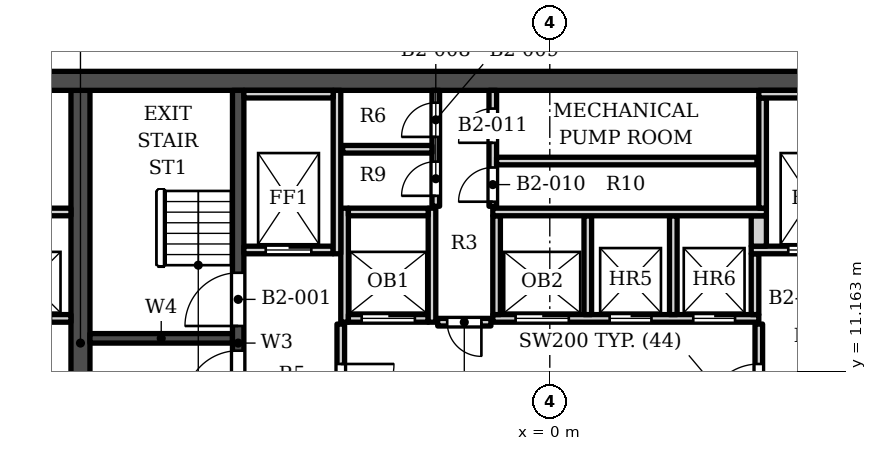
"""IFC4 building model, lengths in metres.
Left out: names, types, materials, properties, quantities, classifications, styles, units other than length and angle.
Written with IfcOpenShell. Run it as: python <this file> out.ifc"""

import sys

from ifc_helpers import new_model, si_unit, direction, frame, frame_2d, origin, place, context, subcontext, project, spatial, rectangle, extrude, element, fill, save


model = new_model("IFC4")
c1 = context("Model", 3, precision=1e-05, world=origin(), true_north=direction((0.0, 1.0)))
c2 = subcontext(c1, "Body", "Model", "MODEL_VIEW")
j1 = project(units=[si_unit("LENGTHUNIT", "METRE"), si_unit("PLANEANGLEUNIT", "RADIAN")], contexts=[c1])
p1 = place(None, origin())
s1 = spatial("IfcSite", under=j1, at=p1, CompositionType="ELEMENT")
p2 = place(p1, origin())
s2 = spatial("IfcBuilding", under=s1, at=p2, CompositionType="ELEMENT")
p3 = place(p2, frame((0.0, 0.0, -10.0)))
s3 = spatial("IfcBuildingStorey", under=s2, at=p3, CompositionType="ELEMENT", Elevation=-10.0)
p4 = place(p3, frame((-16.9, 18.802, -1.6), z_axis=(0.0, 0.0, 1.0), x_axis=(1.0, 0.0, 0.0)))
e1 = element("IfcWall", 1, at=p4, inside=s3, PredefinedType="SHEAR", context=c2, shape_type="SweptSolid", body=[
    extrude(rectangle(XDim=33.8, YDim=0.5, at=frame_2d((16.9, 0.0))), origin(), (0.0, 0.0, 1.0), 6.6),
])
p5 = place(p3, frame((-12.35, 5.253, -1.6), z_axis=(0.0, 0.0, 1.0), x_axis=(0.0, 1.0, 0.0)))
e2 = element("IfcWall", 2, at=p5, inside=s3, PredefinedType="SHEAR", context=c2, shape_type="SweptSolid", body=[
    extrude(rectangle(XDim=13.3, YDim=0.5, at=frame_2d((6.65, 0.0))), origin(), (0.0, 0.0, 1.0), 6.6),
])
p6 = place(p3, frame((-8.2, 5.253, -1.6), z_axis=(0.0, 0.0, 1.0), x_axis=(0.0, 1.0, 0.0)))
e3 = element("IfcWall", 3, at=p6, inside=s3, PredefinedType="SHEAR", context=c2, shape_type="SweptSolid", body=[
    extrude(rectangle(XDim=13.3, YDim=0.3, at=frame_2d((6.65, 0.0))), origin(), (0.0, 0.0, 1.0), 6.6),
])
p7 = place(p6, frame((7.1, 0.0, 1.6)))
e4 = element("IfcOpeningElement", 4, at=p7, cuts=e3, PredefinedType="OPENING", context=c2, shape_type="SweptSolid", body=[
    extrude(rectangle(XDim=1.4, YDim=2.1, at=frame_2d((0.7, 1.05))), frame((0.0, 0.16, 0.0), z_axis=(0.0, -1.0, 0.0), x_axis=(1.0, 0.0, 0.0)), (0.0, 0.0, 1.0), 0.32),
])
p8 = place(p6, frame((5.05, 0.0, 1.6)))
e5 = element("IfcOpeningElement", 5, at=p8, cuts=e3, PredefinedType="OPENING", context=c2, shape_type="SweptSolid", body=[
    extrude(rectangle(XDim=1.4, YDim=2.1, at=frame_2d((0.7, 1.05))), frame((0.0, 0.16, 0.0), z_axis=(0.0, -1.0, 0.0), x_axis=(1.0, 0.0, 0.0)), (0.0, 0.0, 1.0), 0.32),
])
p9 = place(p3, frame((-12.1, 12.028, -1.6), z_axis=(0.0, 0.0, 1.0), x_axis=(1.0, 0.0, 0.0)))
e6 = element("IfcWall", 6, at=p9, inside=s3, PredefinedType="SHEAR", context=c2, shape_type="SweptSolid", body=[
    extrude(rectangle(XDim=3.75, YDim=0.25, at=frame_2d((1.875, 0.0))), origin(), (0.0, 0.0, 1.0), 6.6),
])
p10 = place(p3, frame((-5.5, 9.103, 0.0), z_axis=(0.0, 0.0, 1.0), x_axis=(0.0, 1.0, 0.0)))
e7 = element("IfcWall", 7, at=p10, inside=s3, PredefinedType="SOLIDWALL", context=c2, shape_type="SweptSolid", body=[
    extrude(rectangle(XDim=3.3, YDim=0.2, at=frame_2d((1.65, 0.0))), origin(), (0.0, 0.0, 1.0), 4.5),
])
p11 = place(p10, frame((0.85, 0.0, 0.0)))
e8 = element("IfcOpeningElement", 8, at=p11, cuts=e7, PredefinedType="OPENING", context=c2, shape_type="SweptSolid", body=[
    extrude(rectangle(XDim=1.4, YDim=2.1, at=frame_2d((0.7, 1.05))), frame((0.0, 0.11, 0.0), z_axis=(0.0, -1.0, 0.0), x_axis=(1.0, 0.0, 0.0)), (0.0, 0.0, 1.0), 0.22),
])
p12 = place(p3, frame((5.5, 9.103, 0.0), z_axis=(0.0, 0.0, 1.0), x_axis=(0.0, 1.0, 0.0)))
e9 = element("IfcWall", 9, at=p12, inside=s3, PredefinedType="SOLIDWALL", context=c2, shape_type="SweptSolid", body=[
    extrude(rectangle(XDim=3.3, YDim=0.2, at=frame_2d((1.65, 0.0))), origin(), (0.0, 0.0, 1.0), 4.5),
])
p13 = place(p12, frame((0.85, 0.0, 0.0)))
e10 = element("IfcOpeningElement", 10, at=p13, cuts=e9, PredefinedType="OPENING", context=c2, shape_type="SweptSolid", body=[
    extrude(rectangle(XDim=1.4, YDim=2.1, at=frame_2d((0.7, 1.05))), frame((0.0, 0.11, 0.0), z_axis=(0.0, -1.0, 0.0), x_axis=(1.0, 0.0, 0.0)), (0.0, 0.0, 1.0), 0.22),
])
p14 = place(p3, frame((-2.95, 12.453, 0.0), z_axis=(0.0, 0.0, 1.0), x_axis=(1.0, 0.0, 0.0)))
e11 = element("IfcWall", 11, at=p14, inside=s3, PredefinedType="SOLIDWALL", context=c2, shape_type="SweptSolid", body=[
    extrude(rectangle(XDim=1.4, YDim=0.2, at=frame_2d((0.7, 0.0))), origin(), (0.0, 0.0, 1.0), 4.5),
])
p15 = place(p14, frame((0.25, 0.0, 0.0)))
e12 = element("IfcOpeningElement", 12, at=p15, cuts=e11, PredefinedType="OPENING", context=c2, shape_type="SweptSolid", body=[
    extrude(rectangle(XDim=0.9, YDim=2.1, at=frame_2d((0.45, 1.05))), frame((0.0, 0.11, 0.0), z_axis=(0.0, -1.0, 0.0), x_axis=(1.0, 0.0, 0.0)), (0.0, 0.0, 1.0), 0.22),
])
p16 = place(p3, frame((-16.9, 12.552, 0.0), z_axis=(0.0, 0.0, 1.0), x_axis=(1.0, 0.0, 0.0)))
e13 = element("IfcWall", 13, at=p16, inside=s3, PredefinedType="SOLIDWALL", context=c2, shape_type="SweptSolid", body=[
    extrude(rectangle(XDim=4.3, YDim=0.2, at=frame_2d((2.15, 0.0))), origin(), (0.0, 0.0, 1.0), 4.5),
])
p17 = place(p16, frame((2.675, 0.0, 0.0)))
e14 = element("IfcOpeningElement", 14, at=p17, cuts=e13, PredefinedType="OPENING", context=c2, shape_type="SweptSolid", body=[
    extrude(rectangle(XDim=1.1, YDim=2.1, at=frame_2d((0.55, 1.05))), frame((0.0, 0.11, 0.0), z_axis=(0.0, -1.0, 0.0), x_axis=(1.0, 0.0, 0.0)), (0.0, 0.0, 1.0), 0.22),
])
p18 = place(p16, frame((0.425, 0.0, 0.0)))
e15 = element("IfcOpeningElement", 15, at=p18, cuts=e13, PredefinedType="OPENING", context=c2, shape_type="SweptSolid", body=[
    extrude(rectangle(XDim=1.1, YDim=2.1, at=frame_2d((0.55, 1.05))), frame((0.0, 0.11, 0.0), z_axis=(0.0, -1.0, 0.0), x_axis=(1.0, 0.0, 0.0)), (0.0, 0.0, 1.0), 0.22),
])
p19 = place(p3, frame((-5.4, 12.453, 0.0), z_axis=(0.0, 0.0, 1.0), x_axis=(0.0, 1.0, 0.0)))
e16 = element("IfcWall", 16, at=p19, inside=s3, PredefinedType="SOLIDWALL", context=c2, shape_type="SweptSolid", body=[
    extrude(rectangle(XDim=3.0, YDim=0.2, at=frame_2d((1.5, 0.0))), origin(), (0.0, 0.0, 1.0), 4.5),
])
p20 = place(p3, frame((-5.3, 12.552, 0.0), z_axis=(0.0, 0.0, 1.0), x_axis=(1.0, 0.0, 0.0)))
e17 = element("IfcWall", 17, at=p20, inside=s3, PredefinedType="SOLIDWALL", context=c2, shape_type="SweptSolid", body=[
    extrude(rectangle(XDim=2.1, YDim=0.2, at=frame_2d((1.05, 0.0))), origin(), (0.0, 0.0, 1.0), 4.5),
])
p21 = place(p20, frame((0.35, 0.0, 0.0)))
e18 = element("IfcOpeningElement", 18, at=p21, cuts=e17, PredefinedType="OPENING", context=c2, shape_type="SweptSolid", body=[
    extrude(rectangle(XDim=1.4, YDim=2.4, at=frame_2d((0.7, 1.2))), frame((0.0, 0.11, 0.0), z_axis=(0.0, -1.0, 0.0), x_axis=(1.0, 0.0, 0.0)), (0.0, 0.0, 1.0), 0.22),
])
p22 = place(p3, frame((-3.1, 12.453, 0.0), z_axis=(0.0, 0.0, 1.0), x_axis=(0.0, 1.0, 0.0)))
e19 = element("IfcWall", 19, at=p22, inside=s3, PredefinedType="SOLIDWALL", context=c2, shape_type="SweptSolid", body=[
    extrude(rectangle(XDim=3.0, YDim=0.2, at=frame_2d((1.5, 0.0))), origin(), (0.0, 0.0, 1.0), 4.5),
])
p23 = place(p3, frame((-1.5, 12.552, 0.0), z_axis=(0.0, 0.0, 1.0), x_axis=(1.0, 0.0, 0.0)))
e20 = element("IfcWall", 20, at=p23, inside=s3, PredefinedType="SOLIDWALL", context=c2, shape_type="SweptSolid", body=[
    extrude(rectangle(XDim=7.0, YDim=0.2, at=frame_2d((3.5, 0.0))), origin(), (0.0, 0.0, 1.0), 4.5),
])
p24 = place(p23, frame((0.6, 0.0, 0.0)))
e21 = element("IfcOpeningElement", 21, at=p24, cuts=e20, PredefinedType="OPENING", context=c2, shape_type="SweptSolid", body=[
    extrude(rectangle(XDim=1.4, YDim=2.4, at=frame_2d((0.7, 1.2))), frame((0.0, 0.11, 0.0), z_axis=(0.0, -1.0, 0.0), x_axis=(1.0, 0.0, 0.0)), (0.0, 0.0, 1.0), 0.22),
])
p25 = place(p23, frame((3.075, 0.0, 0.0)))
e22 = element("IfcOpeningElement", 22, at=p25, cuts=e20, PredefinedType="OPENING", context=c2, shape_type="SweptSolid", body=[
    extrude(rectangle(XDim=1.1, YDim=2.1, at=frame_2d((0.55, 1.05))), frame((0.0, 0.11, 0.0), z_axis=(0.0, -1.0, 0.0), x_axis=(1.0, 0.0, 0.0)), (0.0, 0.0, 1.0), 0.22),
])
p26 = place(p23, frame((5.275, 0.0, 0.0)))
e23 = element("IfcOpeningElement", 23, at=p26, cuts=e20, PredefinedType="OPENING", context=c2, shape_type="SweptSolid", body=[
    extrude(rectangle(XDim=1.1, YDim=2.1, at=frame_2d((0.55, 1.05))), frame((0.0, 0.11, 0.0), z_axis=(0.0, -1.0, 0.0), x_axis=(1.0, 0.0, 0.0)), (0.0, 0.0, 1.0), 0.22),
])
for number, where, z_axis, x_axis in (
    (24, (-1.4, 12.653, 0.0), (0.0, 0.0, 1.0), (0.0, 1.0, 0.0)),
    (25, (1.0, 12.653, 0.0), (0.0, 0.0, 1.0), (0.0, 1.0, 0.0)),
    (26, (3.25, 12.653, 0.0), (0.0, 0.0, 1.0), (0.0, 1.0, 0.0)),
):
    element("IfcWall", number, at=place(p3, frame(where, z_axis=z_axis, x_axis=x_axis)), inside=s3, PredefinedType="SOLIDWALL", context=c2, shape_type="SweptSolid", body=[
        extrude(rectangle(XDim=2.6, YDim=0.2, at=frame_2d((1.3, 0.0))), origin(), (0.0, 0.0, 1.0), 4.5),
    ])
p27 = place(p3, frame((5.4, 12.653, 0.0), z_axis=(0.0, 0.0, 1.0), x_axis=(0.0, 1.0, 0.0)))
e27 = element("IfcWall", 27, at=p27, inside=s3, PredefinedType="SOLIDWALL", context=c2, shape_type="SweptSolid", body=[
    extrude(rectangle(XDim=1.6, YDim=0.2, at=frame_2d((0.8, 0.0))), origin(), (0.0, 0.0, 1.0), 4.5),
])
p28 = place(p3, frame((-8.05, 14.353, 0.0), z_axis=(0.0, 0.0, 1.0), x_axis=(1.0, 0.0, 0.0)))
e28 = element("IfcWall", 28, at=p28, inside=s3, PredefinedType="SOLIDWALL", context=c2, shape_type="SweptSolid", body=[
    extrude(rectangle(XDim=2.35, YDim=0.2, at=frame_2d((1.175, 0.0))), origin(), (0.0, 0.0, 1.0), 4.5),
])
p29 = place(p28, frame((0.575, 0.0, 0.0)))
e29 = element("IfcOpeningElement", 29, at=p29, cuts=e28, PredefinedType="OPENING", context=c2, shape_type="SweptSolid", body=[
    extrude(rectangle(XDim=1.2, YDim=2.1, at=frame_2d((0.6, 1.05))), frame((0.0, 0.11, 0.0), z_axis=(0.0, -1.0, 0.0), x_axis=(1.0, 0.0, 0.0)), (0.0, 0.0, 1.0), 0.22),
])
p30 = place(p3, frame((-5.6, 14.253, 0.0), z_axis=(0.0, 0.0, 1.0), x_axis=(0.0, 1.0, 0.0)))
e30 = element("IfcWall", 30, at=p30, inside=s3, PredefinedType="SOLIDWALL", context=c2, shape_type="SweptSolid", body=[
    extrude(rectangle(XDim=4.3, YDim=0.2, at=frame_2d((2.15, 0.0))), origin(), (0.0, 0.0, 1.0), 4.5),
])
p31 = place(p3, frame((5.3, 14.353, 0.0), z_axis=(0.0, 0.0, 1.0), x_axis=(1.0, 0.0, 0.0)))
e31 = element("IfcWall", 31, at=p31, inside=s3, PredefinedType="SOLIDWALL", context=c2, shape_type="SweptSolid", body=[
    extrude(rectangle(XDim=2.75, YDim=0.2, at=frame_2d((1.375, 0.0))), origin(), (0.0, 0.0, 1.0), 4.5),
])
p32 = place(p31, frame((0.975, 0.0, 0.0)))
e32 = element("IfcOpeningElement", 32, at=p32, cuts=e31, PredefinedType="OPENING", context=c2, shape_type="SweptSolid", body=[
    extrude(rectangle(XDim=1.2, YDim=2.1, at=frame_2d((0.6, 1.05))), frame((0.0, 0.11, 0.0), z_axis=(0.0, -1.0, 0.0), x_axis=(1.0, 0.0, 0.0)), (0.0, 0.0, 1.0), 0.22),
])
p33 = place(p3, frame((5.5, 14.453, 0.0), z_axis=(0.0, 0.0, 1.0), x_axis=(0.0, 1.0, 0.0)))
e33 = element("IfcWall", 33, at=p33, inside=s3, PredefinedType="SOLIDWALL", context=c2, shape_type="SweptSolid", body=[
    extrude(rectangle(XDim=0.8, YDim=0.4, at=frame_2d((0.4, 0.0))), origin(), (0.0, 0.0, 1.0), 4.5),
])
p34 = place(p3, frame((-16.9, 15.353, 0.0), z_axis=(0.0, 0.0, 1.0), x_axis=(1.0, 0.0, 0.0)))
e34 = element("IfcWall", 34, at=p34, inside=s3, PredefinedType="SOLIDWALL", context=c2, shape_type="SweptSolid", body=[
    extrude(rectangle(XDim=4.3, YDim=0.2, at=frame_2d((2.15, 0.0))), origin(), (0.0, 0.0, 1.0), 4.5),
])
p35 = place(p3, frame((-5.3, 15.353, 0.0), z_axis=(0.0, 0.0, 1.0), x_axis=(1.0, 0.0, 0.0)))
e35 = element("IfcWall", 35, at=p35, inside=s3, PredefinedType="SOLIDWALL", context=c2, shape_type="SweptSolid", body=[
    extrude(rectangle(XDim=2.1, YDim=0.2, at=frame_2d((1.05, 0.0))), origin(), (0.0, 0.0, 1.0), 4.5),
])
p36 = place(p3, frame((-1.5, 15.353, 0.0), z_axis=(0.0, 0.0, 1.0), x_axis=(1.0, 0.0, 0.0)))
e36 = element("IfcWall", 36, at=p36, inside=s3, PredefinedType="SOLIDWALL", context=c2, shape_type="SweptSolid", body=[
    extrude(rectangle(XDim=7.2, YDim=0.2, at=frame_2d((3.6, 0.0))), origin(), (0.0, 0.0, 1.0), 4.5),
])
p37 = place(p3, frame((5.6, 15.453, 0.0), z_axis=(0.0, 0.0, 1.0), x_axis=(0.0, 1.0, 0.0)))
e37 = element("IfcWall", 37, at=p37, inside=s3, PredefinedType="SOLIDWALL", context=c2, shape_type="SweptSolid", body=[
    extrude(rectangle(XDim=2.9, YDim=0.2, at=frame_2d((1.45, 0.0))), origin(), (0.0, 0.0, 1.0), 4.5),
])
p38 = place(p3, frame((-3.0, 15.503, 0.0), z_axis=(0.0, 0.0, 1.0), x_axis=(0.0, 1.0, 0.0)))
e38 = element("IfcWall", 38, at=p38, inside=s3, PredefinedType="SOLIDWALL", context=c2, shape_type="SweptSolid", body=[
    extrude(rectangle(XDim=3.05, YDim=0.2, at=frame_2d((1.525, 0.0))), origin(), (0.0, 0.0, 1.0), 4.5),
])
p39 = place(p38, frame((0.275, 0.0, 0.0)))
e39 = element("IfcOpeningElement", 39, at=p39, cuts=e38, PredefinedType="OPENING", context=c2, shape_type="SweptSolid", body=[
    extrude(rectangle(XDim=0.9, YDim=2.1, at=frame_2d((0.45, 1.05))), frame((0.0, 0.11, 0.0), z_axis=(0.0, -1.0, 0.0), x_axis=(1.0, 0.0, 0.0)), (0.0, 0.0, 1.0), 0.22),
])
p40 = place(p38, frame((1.825, 0.0, 0.0)))
e40 = element("IfcOpeningElement", 40, at=p40, cuts=e38, PredefinedType="OPENING", context=c2, shape_type="SweptSolid", body=[
    extrude(rectangle(XDim=0.9, YDim=2.1, at=frame_2d((0.45, 1.05))), frame((0.0, 0.11, 0.0), z_axis=(0.0, -1.0, 0.0), x_axis=(1.0, 0.0, 0.0)), (0.0, 0.0, 1.0), 0.22),
])
p41 = place(p3, frame((-1.5, 15.503, 0.0), z_axis=(0.0, 0.0, 1.0), x_axis=(0.0, 1.0, 0.0)))
e41 = element("IfcWall", 41, at=p41, inside=s3, PredefinedType="SOLIDWALL", context=c2, shape_type="SweptSolid", body=[
    extrude(rectangle(XDim=3.05, YDim=0.2, at=frame_2d((1.525, 0.0))), origin(), (0.0, 0.0, 1.0), 4.5),
])
p42 = place(p41, frame((0.12, 0.0, 0.0)))
e42 = element("IfcOpeningElement", 42, at=p42, cuts=e41, PredefinedType="OPENING", context=c2, shape_type="SweptSolid", body=[
    extrude(rectangle(XDim=0.9, YDim=2.1, at=frame_2d((0.45, 1.05))), frame((0.0, 0.11, 0.0), z_axis=(0.0, -1.0, 0.0), x_axis=(1.0, 0.0, 0.0)), (0.0, 0.0, 1.0), 0.22),
])
p43 = place(p41, frame((1.67, 0.0, 0.0)))
e43 = element("IfcOpeningElement", 43, at=p43, cuts=e41, PredefinedType="OPENING", context=c2, shape_type="SweptSolid", body=[
    extrude(rectangle(XDim=0.9, YDim=2.1, at=frame_2d((0.45, 1.05))), frame((0.0, 0.11, 0.0), z_axis=(0.0, -1.0, 0.0), x_axis=(1.0, 0.0, 0.0)), (0.0, 0.0, 1.0), 0.22),
])
p44 = place(p3, frame((-1.4, 16.693, 0.0), z_axis=(0.0, 0.0, 1.0), x_axis=(1.0, 0.0, 0.0)))
e44 = element("IfcWall", 44, at=p44, inside=s3, PredefinedType="SOLIDWALL", context=c2, shape_type="SweptSolid", body=[
    extrude(rectangle(XDim=6.85, YDim=0.2, at=frame_2d((3.425, 0.0))), origin(), (0.0, 0.0, 1.0), 4.5),
])
p45 = place(p3, frame((-5.45, 17.003, 0.0), z_axis=(0.0, 0.0, 1.0), x_axis=(1.0, 0.0, 0.0)))
e45 = element("IfcWall", 45, at=p45, inside=s3, PredefinedType="SOLIDWALL", context=c2, shape_type="SweptSolid", body=[
    extrude(rectangle(XDim=2.35, YDim=0.2, at=frame_2d((1.175, 0.0))), origin(), (0.0, 0.0, 1.0), 4.5),
])
p46 = place(p3, frame((-8.05, 18.453, 0.0), z_axis=(0.0, 0.0, 1.0), x_axis=(1.0, 0.0, 0.0)))
e46 = element("IfcWall", 46, at=p46, inside=s3, PredefinedType="SOLIDWALL", context=c2, shape_type="SweptSolid", body=[
    extrude(rectangle(XDim=2.35, YDim=0.2, at=frame_2d((1.175, 0.0))), origin(), (0.0, 0.0, 1.0), 4.5),
])
p47 = place(p3, frame((5.5, 18.453, 0.0), z_axis=(0.0, 0.0, 1.0), x_axis=(1.0, 0.0, 0.0)))
e47 = element("IfcWall", 47, at=p47, inside=s3, PredefinedType="SOLIDWALL", context=c2, shape_type="SweptSolid", body=[
    extrude(rectangle(XDim=2.55, YDim=0.2, at=frame_2d((1.275, 0.0))), origin(), (0.0, 0.0, 1.0), 4.5),
])
p48 = place(p21, origin())
e48 = element("IfcDoor", 48, at=p48, inside=s3, OperationType="DOUBLE_DOOR_SLIDING", PredefinedType="DOOR", context=c2, shape_type="SweptSolid", body=[
    extrude(rectangle(XDim=1.4, YDim=2.4, at=frame_2d((0.7, 1.2))), frame((0.0, 0.025, 0.0), z_axis=(0.0, -1.0, 0.0), x_axis=(1.0, 0.0, 0.0)), (0.0, 0.0, 1.0), 0.05),
])
fill(e18, e48)
p49 = place(p24, origin())
e49 = element("IfcDoor", 49, at=p49, inside=s3, OperationType="DOUBLE_DOOR_SLIDING", PredefinedType="DOOR", context=c2, shape_type="SweptSolid", body=[
    extrude(rectangle(XDim=1.4, YDim=2.4, at=frame_2d((0.7, 1.2))), frame((0.0, 0.025, 0.0), z_axis=(0.0, -1.0, 0.0), x_axis=(1.0, 0.0, 0.0)), (0.0, 0.0, 1.0), 0.05),
])
fill(e21, e49)
p50 = place(p25, origin())
e50 = element("IfcDoor", 50, at=p50, inside=s3, OperationType="DOUBLE_DOOR_SLIDING", PredefinedType="DOOR", context=c2, shape_type="SweptSolid", body=[
    extrude(rectangle(XDim=1.1, YDim=2.1, at=frame_2d((0.55, 1.05))), frame((0.0, 0.025, 0.0), z_axis=(0.0, -1.0, 0.0), x_axis=(1.0, 0.0, 0.0)), (0.0, 0.0, 1.0), 0.05),
])
fill(e22, e50)
p51 = place(p26, origin())
e51 = element("IfcDoor", 51, at=p51, inside=s3, OperationType="DOUBLE_DOOR_SLIDING", PredefinedType="DOOR", context=c2, shape_type="SweptSolid", body=[
    extrude(rectangle(XDim=1.1, YDim=2.1, at=frame_2d((0.55, 1.05))), frame((0.0, 0.025, 0.0), z_axis=(0.0, -1.0, 0.0), x_axis=(1.0, 0.0, 0.0)), (0.0, 0.0, 1.0), 0.05),
])
fill(e23, e51)
p52 = place(p29, origin())
e52 = element("IfcDoor", 52, at=p52, inside=s3, OperationType="DOUBLE_DOOR_SLIDING", PredefinedType="DOOR", context=c2, shape_type="SweptSolid", body=[
    extrude(rectangle(XDim=1.2, YDim=2.1, at=frame_2d((0.6, 1.05))), frame((0.0, 0.025, 0.0), z_axis=(0.0, -1.0, 0.0), x_axis=(1.0, 0.0, 0.0)), (0.0, 0.0, 1.0), 0.05),
])
fill(e29, e52)
p53 = place(p32, origin())
e53 = element("IfcDoor", 53, at=p53, inside=s3, OperationType="DOUBLE_DOOR_SLIDING", PredefinedType="DOOR", context=c2, shape_type="SweptSolid", body=[
    extrude(rectangle(XDim=1.2, YDim=2.1, at=frame_2d((0.6, 1.05))), frame((0.0, 0.025, 0.0), z_axis=(0.0, -1.0, 0.0), x_axis=(1.0, 0.0, 0.0)), (0.0, 0.0, 1.0), 0.05),
])
fill(e32, e53)
p54 = place(p7, origin())
e54 = element("IfcDoor", 54, at=p54, inside=s3, OperationType="SINGLE_SWING_LEFT", PredefinedType="DOOR", context=c2, shape_type="SweptSolid", body=[
    extrude(rectangle(XDim=1.4, YDim=2.1, at=frame_2d((0.7, 1.05))), frame((0.0, 0.025, 0.0), z_axis=(0.0, -1.0, 0.0), x_axis=(1.0, 0.0, 0.0)), (0.0, 0.0, 1.0), 0.05),
])
fill(e4, e54)
p55 = place(p8, origin())
e55 = element("IfcDoor", 55, at=p55, inside=s3, OperationType="SINGLE_SWING_LEFT", PredefinedType="DOOR", context=c2, shape_type="SweptSolid", body=[
    extrude(rectangle(XDim=1.4, YDim=2.1, at=frame_2d((0.7, 1.05))), frame((0.0, 0.025, 0.0), z_axis=(0.0, -1.0, 0.0), x_axis=(1.0, 0.0, 0.0)), (0.0, 0.0, 1.0), 0.05),
])
fill(e5, e55)
p56 = place(p15, origin())
e56 = element("IfcDoor", 56, at=p56, inside=s3, OperationType="SINGLE_SWING_RIGHT", PredefinedType="DOOR", context=c2, shape_type="SweptSolid", body=[
    extrude(rectangle(XDim=0.9, YDim=2.1, at=frame_2d((0.45, 1.05))), frame((0.0, 0.025, 0.0), z_axis=(0.0, -1.0, 0.0), x_axis=(1.0, 0.0, 0.0)), (0.0, 0.0, 1.0), 0.05),
])
fill(e12, e56)
p57 = place(p11, origin())
e57 = element("IfcDoor", 57, at=p57, inside=s3, OperationType="SINGLE_SWING_RIGHT", PredefinedType="DOOR", context=c2, shape_type="SweptSolid", body=[
    extrude(rectangle(XDim=1.4, YDim=2.1, at=frame_2d((0.7, 1.05))), frame((0.0, 0.025, 0.0), z_axis=(0.0, -1.0, 0.0), x_axis=(1.0, 0.0, 0.0)), (0.0, 0.0, 1.0), 0.05),
])
fill(e8, e57)
p58 = place(p13, origin())
e58 = element("IfcDoor", 58, at=p58, inside=s3, OperationType="SINGLE_SWING_LEFT", PredefinedType="DOOR", context=c2, shape_type="SweptSolid", body=[
    extrude(rectangle(XDim=1.4, YDim=2.1, at=frame_2d((0.7, 1.05))), frame((0.0, 0.025, 0.0), z_axis=(0.0, -1.0, 0.0), x_axis=(1.0, 0.0, 0.0)), (0.0, 0.0, 1.0), 0.05),
])
fill(e10, e58)
p59 = place(p39, origin())
e59 = element("IfcDoor", 59, at=p59, inside=s3, OperationType="SINGLE_SWING_LEFT", PredefinedType="DOOR", context=c2, shape_type="SweptSolid", body=[
    extrude(rectangle(XDim=0.9, YDim=2.1, at=frame_2d((0.45, 1.05))), frame((0.0, 0.025, 0.0), z_axis=(0.0, -1.0, 0.0), x_axis=(1.0, 0.0, 0.0)), (0.0, 0.0, 1.0), 0.05),
])
fill(e39, e59)
p60 = place(p40, origin())
e60 = element("IfcDoor", 60, at=p60, inside=s3, OperationType="SINGLE_SWING_LEFT", PredefinedType="DOOR", context=c2, shape_type="SweptSolid", body=[
    extrude(rectangle(XDim=0.9, YDim=2.1, at=frame_2d((0.45, 1.05))), frame((0.0, 0.025, 0.0), z_axis=(0.0, -1.0, 0.0), x_axis=(1.0, 0.0, 0.0)), (0.0, 0.0, 1.0), 0.05),
])
fill(e40, e60)
p61 = place(p42, origin())
e61 = element("IfcDoor", 61, at=p61, inside=s3, OperationType="SINGLE_SWING_LEFT", PredefinedType="DOOR", context=c2, shape_type="SweptSolid", body=[
    extrude(rectangle(XDim=0.9, YDim=2.1, at=frame_2d((0.45, 1.05))), frame((0.0, 0.025, 0.0), z_axis=(0.0, -1.0, 0.0), x_axis=(1.0, 0.0, 0.0)), (0.0, 0.0, 1.0), 0.05),
])
fill(e42, e61)
p62 = place(p43, origin())
e62 = element("IfcDoor", 62, at=p62, inside=s3, OperationType="SINGLE_SWING_LEFT", PredefinedType="DOOR", context=c2, shape_type="SweptSolid", body=[
    extrude(rectangle(XDim=0.9, YDim=2.1, at=frame_2d((0.45, 1.05))), frame((0.0, 0.025, 0.0), z_axis=(0.0, -1.0, 0.0), x_axis=(1.0, 0.0, 0.0)), (0.0, 0.0, 1.0), 0.05),
])
fill(e43, e62)
save(model, sys.argv[1])
